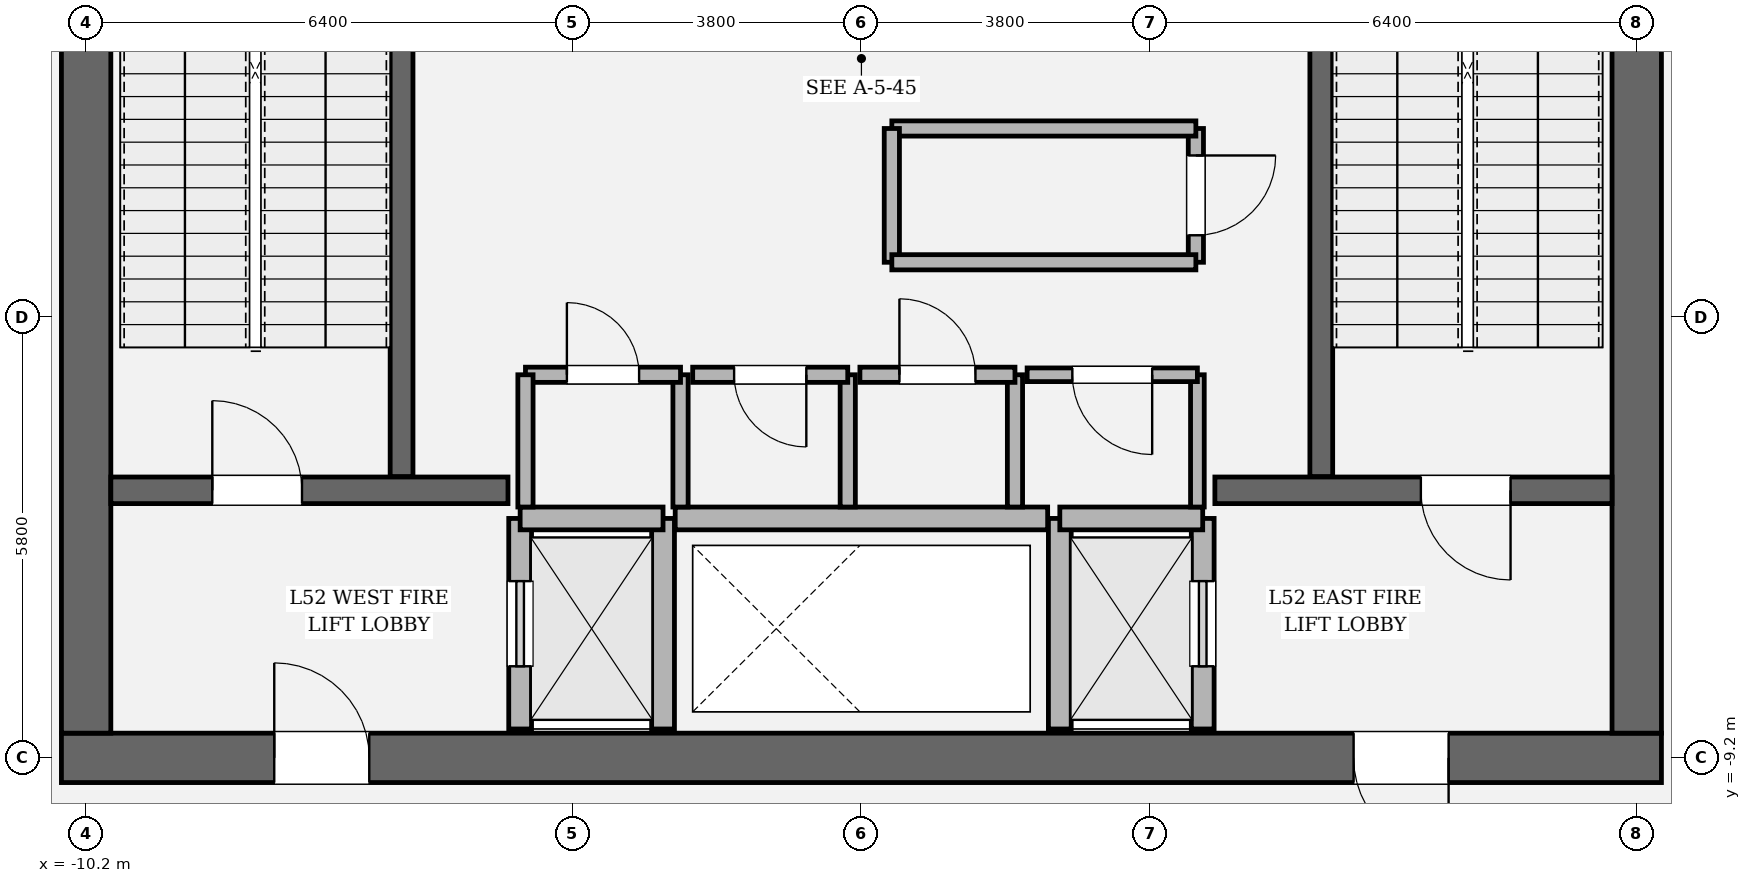
"""IFC4 building model, lengths in metres.
Left out: names, types, materials, properties, quantities, classifications, styles, units other than length and angle.
Written with IfcOpenShell. Run it as: python <this file> out.ifc"""

import sys

from ifc_helpers import new_model, si_unit, direction, frame, frame_2d, origin, place, context, subcontext, project, spatial, rectangle, extrude, element, fill, save


model = new_model("IFC4")
c1 = context("Model", 3, precision=1e-05, world=origin(), true_north=direction((0.0, 1.0)))
c2 = subcontext(c1, "Body", "Model", "MODEL_VIEW")
j1 = project(units=[si_unit("LENGTHUNIT", "METRE"), si_unit("PLANEANGLEUNIT", "RADIAN")], contexts=[c1])
p1 = place(None, origin())
s1 = spatial("IfcSite", under=j1, at=p1, CompositionType="ELEMENT")
p2 = place(p1, origin())
s2 = spatial("IfcBuilding", under=s1, at=p2, CompositionType="ELEMENT")
p3 = place(p2, frame((0.0, 0.0, 220.8)))
s3 = spatial("IfcBuildingStorey", under=s2, at=p3, CompositionType="ELEMENT", Elevation=220.8)
p4 = place(p3, frame((10.525, -9.2, 0.0), z_axis=(0.0, 0.0, 1.0), x_axis=(-1.0, 0.0, 0.0)))
e1 = element("IfcWall", 1, at=p4, inside=s3, PredefinedType="SHEAR", context=c2, shape_type="SweptSolid", body=[
    extrude(rectangle(XDim=21.05, YDim=0.65, at=frame_2d((10.525, 0.0))), origin(), (0.0, 0.0, 1.0), 4.05),
])
p5 = place(p4, frame((2.8, 0.0, 0.0)))
e2 = element("IfcOpeningElement", 2, at=p5, cuts=e1, PredefinedType="OPENING", context=c2, shape_type="SweptSolid", body=[
    extrude(rectangle(XDim=1.25, YDim=2.25, at=frame_2d((0.625, 1.125))), frame((0.0, 0.335, 0.0), z_axis=(0.0, -1.0, 0.0), x_axis=(1.0, 0.0, 0.0)), (0.0, 0.0, 1.0), 0.67),
])
p6 = place(p4, frame((17.0, 0.0, 0.0)))
e3 = element("IfcOpeningElement", 3, at=p6, cuts=e1, PredefinedType="OPENING", context=c2, shape_type="SweptSolid", body=[
    extrude(rectangle(XDim=1.25, YDim=2.25, at=frame_2d((0.625, 1.125))), frame((0.0, 0.335, 0.0), z_axis=(0.0, -1.0, 0.0), x_axis=(1.0, 0.0, 0.0)), (0.0, 0.0, 1.0), 0.67),
])
p7 = place(p3, frame((-10.2, -8.875, 0.0), z_axis=(0.0, 0.0, 1.0), x_axis=(0.0, 1.0, 0.0)))
e4 = element("IfcWall", 4, at=p7, inside=s3, PredefinedType="SHEAR", context=c2, shape_type="SweptSolid", body=[
    extrude(rectangle(XDim=17.75, YDim=0.65, at=frame_2d((8.875, 0.0))), origin(), (0.0, 0.0, 1.0), 4.05),
])
p8 = place(p7, frame((12.665, 0.0, 0.0)))
e5 = element("IfcOpeningElement", 5, at=p8, cuts=e4, PredefinedType="OPENING", context=c2, shape_type="SweptSolid", body=[
    extrude(rectangle(XDim=1.18, YDim=2.2, at=frame_2d((0.59, 1.1))), frame((0.0, 0.335, 0.0), z_axis=(0.0, -1.0, 0.0), x_axis=(1.0, 0.0, 0.0)), (0.0, 0.0, 1.0), 0.67),
])
p9 = place(p3, frame((10.2, 8.875, 0.0), z_axis=(0.0, 0.0, 1.0), x_axis=(0.0, -1.0, 0.0)))
e6 = element("IfcWall", 6, at=p9, inside=s3, PredefinedType="SHEAR", context=c2, shape_type="SweptSolid", body=[
    extrude(rectangle(XDim=17.75, YDim=0.65, at=frame_2d((8.875, 0.0))), origin(), (0.0, 0.0, 1.0), 4.05),
])
p10 = place(p9, frame((3.905, 0.0, 0.0)))
e7 = element("IfcOpeningElement", 7, at=p10, cuts=e6, PredefinedType="OPENING", context=c2, shape_type="SweptSolid", body=[
    extrude(rectangle(XDim=1.18, YDim=2.2, at=frame_2d((0.59, 1.1))), frame((0.0, 0.335, 0.0), z_axis=(0.0, -1.0, 0.0), x_axis=(1.0, 0.0, 0.0)), (0.0, 0.0, 1.0), 0.67),
])
for number, where, z_axis, x_axis in (
    (8, (-6.05, -5.5, 0.0), (0.0, 0.0, 1.0), (0.0, 1.0, 0.0)),
    (9, (6.05, 3.45, 0.0), (0.0, 0.0, 1.0), (0.0, -1.0, 0.0)),
):
    element("IfcWall", number, at=place(p3, frame(where, z_axis=z_axis, x_axis=x_axis)), inside=s3, PredefinedType="SOLIDWALL", context=c2, shape_type="SweptSolid", body=[
        extrude(rectangle(XDim=8.95, YDim=0.3, at=frame_2d((4.475, 0.0))), origin(), (0.0, 0.0, 1.0), 4.05),
    ])
p11 = place(p3, frame((-9.875, -5.68, 0.0), z_axis=(0.0, 0.0, 1.0), x_axis=(1.0, 0.0, 0.0)))
e10 = element("IfcWall", 10, at=p11, inside=s3, PredefinedType="SOLIDWALL", context=c2, shape_type="SweptSolid", body=[
    extrude(rectangle(XDim=5.225, YDim=0.35, at=frame_2d((2.613, 0.0))), origin(), (0.0, 0.0, 1.0), 4.05),
])
p12 = place(p11, frame((1.335, 0.0, 0.0)))
e11 = element("IfcOpeningElement", 11, at=p12, cuts=e10, PredefinedType="OPENING", context=c2, shape_type="SweptSolid", body=[
    extrude(rectangle(XDim=1.18, YDim=2.2, at=frame_2d((0.59, 1.1))), frame((0.0, 0.185, 0.0), z_axis=(0.0, -1.0, 0.0), x_axis=(1.0, 0.0, 0.0)), (0.0, 0.0, 1.0), 0.37),
])
p13 = place(p3, frame((4.65, -5.68, 0.0), z_axis=(0.0, 0.0, 1.0), x_axis=(1.0, 0.0, 0.0)))
e12 = element("IfcWall", 12, at=p13, inside=s3, PredefinedType="SOLIDWALL", context=c2, shape_type="SweptSolid", body=[
    extrude(rectangle(XDim=5.225, YDim=0.35, at=frame_2d((2.613, 0.0))), origin(), (0.0, 0.0, 1.0), 4.05),
])
p14 = place(p13, frame((2.71, 0.0, 0.0)))
e13 = element("IfcOpeningElement", 13, at=p14, cuts=e12, PredefinedType="OPENING", context=c2, shape_type="SweptSolid", body=[
    extrude(rectangle(XDim=1.18, YDim=2.2, at=frame_2d((0.59, 1.1))), frame((0.0, 0.185, 0.0), z_axis=(0.0, -1.0, 0.0), x_axis=(1.0, 0.0, 0.0)), (0.0, 0.0, 1.0), 0.37),
])
p15 = place(p3, frame((-4.49, -8.82, 0.0), z_axis=(0.0, 0.0, 1.0), x_axis=(0.0, 1.0, 0.0)))
e14 = element("IfcWall", 14, at=p15, inside=s3, PredefinedType="SOLIDWALL", context=c2, shape_type="SweptSolid", body=[
    extrude(rectangle(XDim=2.77, YDim=0.3, at=frame_2d((1.385, 0.0))), origin(), (0.0, 0.0, 1.0), 3.83),
])
p16 = place(p15, frame((0.825, 0.0, 0.0)))
e15 = element("IfcOpeningElement", 15, at=p16, cuts=e14, PredefinedType="OPENING", context=c2, shape_type="SweptSolid", body=[
    extrude(rectangle(XDim=1.12, YDim=2.25, at=frame_2d((0.56, 1.125))), frame((0.0, 0.16, 0.0), z_axis=(0.0, -1.0, 0.0), x_axis=(1.0, 0.0, 0.0)), (0.0, 0.0, 1.0), 0.32),
])
p17 = place(p3, frame((-2.61, -8.82, 0.0), z_axis=(0.0, 0.0, 1.0), x_axis=(0.0, 1.0, 0.0)))
e16 = element("IfcWall", 16, at=p17, inside=s3, PredefinedType="SOLIDWALL", context=c2, shape_type="SweptSolid", body=[
    extrude(rectangle(XDim=2.77, YDim=0.3, at=frame_2d((1.385, 0.0))), origin(), (0.0, 0.0, 1.0), 3.83),
])
p18 = place(p3, frame((-4.49, -6.05, 0.0), z_axis=(0.0, 0.0, 1.0), x_axis=(1.0, 0.0, 0.0)))
e17 = element("IfcWall", 17, at=p18, inside=s3, PredefinedType="SOLIDWALL", context=c2, shape_type="SweptSolid", body=[
    extrude(rectangle(XDim=1.88, YDim=0.3, at=frame_2d((0.94, 0.0))), origin(), (0.0, 0.0, 1.0), 3.83),
])
p19 = place(p3, frame((4.49, -8.82, 0.0), z_axis=(0.0, 0.0, 1.0), x_axis=(0.0, 1.0, 0.0)))
e18 = element("IfcWall", 18, at=p19, inside=s3, PredefinedType="SOLIDWALL", context=c2, shape_type="SweptSolid", body=[
    extrude(rectangle(XDim=2.77, YDim=0.3, at=frame_2d((1.385, 0.0))), origin(), (0.0, 0.0, 1.0), 3.83),
])
p20 = place(p19, frame((0.825, 0.0, 0.0)))
e19 = element("IfcOpeningElement", 19, at=p20, cuts=e18, PredefinedType="OPENING", context=c2, shape_type="SweptSolid", body=[
    extrude(rectangle(XDim=1.12, YDim=2.25, at=frame_2d((0.56, 1.125))), frame((0.0, 0.16, 0.0), z_axis=(0.0, -1.0, 0.0), x_axis=(1.0, 0.0, 0.0)), (0.0, 0.0, 1.0), 0.32),
])
p21 = place(p3, frame((2.61, -8.82, 0.0), z_axis=(0.0, 0.0, 1.0), x_axis=(0.0, 1.0, 0.0)))
e20 = element("IfcWall", 20, at=p21, inside=s3, PredefinedType="SOLIDWALL", context=c2, shape_type="SweptSolid", body=[
    extrude(rectangle(XDim=2.77, YDim=0.3, at=frame_2d((1.385, 0.0))), origin(), (0.0, 0.0, 1.0), 3.83),
])
p22 = place(p3, frame((2.61, -6.05, 0.0), z_axis=(0.0, 0.0, 1.0), x_axis=(1.0, 0.0, 0.0)))
e21 = element("IfcWall", 21, at=p22, inside=s3, PredefinedType="SOLIDWALL", context=c2, shape_type="SweptSolid", body=[
    extrude(rectangle(XDim=1.88, YDim=0.3, at=frame_2d((0.94, 0.0))), origin(), (0.0, 0.0, 1.0), 3.83),
])
p23 = place(p3, frame((-2.45, -6.05, 0.0), z_axis=(0.0, 0.0, 1.0), x_axis=(1.0, 0.0, 0.0)))
e22 = element("IfcWall", 22, at=p23, inside=s3, PredefinedType="SOLIDWALL", context=c2, shape_type="SweptSolid", body=[
    extrude(rectangle(XDim=4.9, YDim=0.3, at=frame_2d((2.45, 0.0))), origin(), (0.0, 0.0, 1.0), 3.83),
])
p24 = place(p3, frame((-2.38, -5.9, 0.0), z_axis=(0.0, 0.0, 1.0), x_axis=(0.0, 1.0, 0.0)))
e23 = element("IfcWall", 23, at=p24, inside=s3, PredefinedType="SOLIDWALL", context=c2, shape_type="SweptSolid", body=[
    extrude(rectangle(XDim=1.74, YDim=0.2, at=frame_2d((0.87, 0.0))), origin(), (0.0, 0.0, 1.0), 3.83),
])
p25 = place(p3, frame((-2.38, -4.16, 0.0), z_axis=(0.0, 0.0, 1.0), x_axis=(-1.0, 0.0, 0.0)))
e24 = element("IfcWall", 24, at=p25, inside=s3, PredefinedType="SOLIDWALL", context=c2, shape_type="SweptSolid", body=[
    extrude(rectangle(XDim=2.04, YDim=0.2, at=frame_2d((1.02, 0.0))), origin(), (0.0, 0.0, 1.0), 3.83),
])
p26 = place(p25, frame((0.545, 0.0, 0.0)))
e25 = element("IfcOpeningElement", 25, at=p26, cuts=e24, PredefinedType="OPENING", context=c2, shape_type="SweptSolid", body=[
    extrude(rectangle(XDim=0.95, YDim=2.15, at=frame_2d((0.475, 1.075))), frame((0.0, 0.11, 0.0), z_axis=(0.0, -1.0, 0.0), x_axis=(1.0, 0.0, 0.0)), (0.0, 0.0, 1.0), 0.22),
])
for number, where, z_axis, x_axis in (
    (26, (-4.42, -4.16, 0.0), (0.0, 0.0, 1.0), (0.0, -1.0, 0.0)),
    (27, (-0.18, -5.9, 0.0), (0.0, 0.0, 1.0), (0.0, 1.0, 0.0)),
):
    element("IfcWall", number, at=place(p3, frame(where, z_axis=z_axis, x_axis=x_axis)), inside=s3, PredefinedType="SOLIDWALL", context=c2, shape_type="SweptSolid", body=[
        extrude(rectangle(XDim=1.74, YDim=0.2, at=frame_2d((0.87, 0.0))), origin(), (0.0, 0.0, 1.0), 3.83),
    ])
p27 = place(p3, frame((-0.18, -4.16, 0.0), z_axis=(0.0, 0.0, 1.0), x_axis=(-1.0, 0.0, 0.0)))
e28 = element("IfcWall", 28, at=p27, inside=s3, PredefinedType="SOLIDWALL", context=c2, shape_type="SweptSolid", body=[
    extrude(rectangle(XDim=2.04, YDim=0.2, at=frame_2d((1.02, 0.0))), origin(), (0.0, 0.0, 1.0), 3.83),
])
p28 = place(p27, frame((0.545, 0.0, 0.0)))
e29 = element("IfcOpeningElement", 29, at=p28, cuts=e28, PredefinedType="OPENING", context=c2, shape_type="SweptSolid", body=[
    extrude(rectangle(XDim=0.95, YDim=2.15, at=frame_2d((0.475, 1.075))), frame((0.0, 0.11, 0.0), z_axis=(0.0, -1.0, 0.0), x_axis=(1.0, 0.0, 0.0)), (0.0, 0.0, 1.0), 0.22),
])
p29 = place(p3, frame((2.02, -5.9, 0.0), z_axis=(0.0, 0.0, 1.0), x_axis=(0.0, 1.0, 0.0)))
e30 = element("IfcWall", 30, at=p29, inside=s3, PredefinedType="SOLIDWALL", context=c2, shape_type="SweptSolid", body=[
    extrude(rectangle(XDim=1.74, YDim=0.2, at=frame_2d((0.87, 0.0))), origin(), (0.0, 0.0, 1.0), 3.83),
])
p30 = place(p3, frame((2.02, -4.16, 0.0), z_axis=(0.0, 0.0, 1.0), x_axis=(-1.0, 0.0, 0.0)))
e31 = element("IfcWall", 31, at=p30, inside=s3, PredefinedType="SOLIDWALL", context=c2, shape_type="SweptSolid", body=[
    extrude(rectangle(XDim=2.04, YDim=0.2, at=frame_2d((1.02, 0.0))), origin(), (0.0, 0.0, 1.0), 3.83),
])
p31 = place(p30, frame((0.52, 0.0, 0.0)))
e32 = element("IfcOpeningElement", 32, at=p31, cuts=e31, PredefinedType="OPENING", context=c2, shape_type="SweptSolid", body=[
    extrude(rectangle(XDim=1.0, YDim=2.15, at=frame_2d((0.5, 1.075))), frame((0.0, 0.11, 0.0), z_axis=(0.0, -1.0, 0.0), x_axis=(1.0, 0.0, 0.0)), (0.0, 0.0, 1.0), 0.22),
])
p32 = place(p3, frame((4.42, -5.9, 0.0), z_axis=(0.0, 0.0, 1.0), x_axis=(0.0, 1.0, 0.0)))
e33 = element("IfcWall", 33, at=p32, inside=s3, PredefinedType="PARTITIONING", context=c2, shape_type="SweptSolid", body=[
    extrude(rectangle(XDim=1.74, YDim=0.18, at=frame_2d((0.87, 0.0))), origin(), (0.0, 0.0, 1.0), 3.83),
])
p33 = place(p3, frame((4.42, -4.16, 0.0), z_axis=(0.0, 0.0, 1.0), x_axis=(-1.0, 0.0, 0.0)))
e34 = element("IfcWall", 34, at=p33, inside=s3, PredefinedType="PARTITIONING", context=c2, shape_type="SweptSolid", body=[
    extrude(rectangle(XDim=2.24, YDim=0.18, at=frame_2d((1.12, 0.0))), origin(), (0.0, 0.0, 1.0), 3.83),
])
p34 = place(p33, frame((0.595, 0.0, 0.0)))
e35 = element("IfcOpeningElement", 35, at=p34, cuts=e34, PredefinedType="OPENING", context=c2, shape_type="SweptSolid", body=[
    extrude(rectangle(XDim=1.05, YDim=2.2, at=frame_2d((0.525, 1.1))), frame((0.0, 0.1, 0.0), z_axis=(0.0, -1.0, 0.0), x_axis=(1.0, 0.0, 0.0)), (0.0, 0.0, 1.0), 0.2),
])
p35 = place(p3, frame((4.4, -2.68, 0.0), z_axis=(0.0, 0.0, 1.0), x_axis=(0.0, 1.0, 0.0)))
e36 = element("IfcWall", 36, at=p35, inside=s3, PredefinedType="SOLIDWALL", context=c2, shape_type="SweptSolid", body=[
    extrude(rectangle(XDim=1.76, YDim=0.2, at=frame_2d((0.88, 0.0))), origin(), (0.0, 0.0, 1.0), 3.83),
])
p36 = place(p35, frame((0.355, 0.0, 0.0)))
e37 = element("IfcOpeningElement", 37, at=p36, cuts=e36, PredefinedType="OPENING", context=c2, shape_type="SweptSolid", body=[
    extrude(rectangle(XDim=1.05, YDim=2.2, at=frame_2d((0.525, 1.1))), frame((0.0, 0.11, 0.0), z_axis=(0.0, -1.0, 0.0), x_axis=(1.0, 0.0, 0.0)), (0.0, 0.0, 1.0), 0.22),
])
p37 = place(p3, frame((4.4, -0.92, 0.0), z_axis=(0.0, 0.0, 1.0), x_axis=(-1.0, 0.0, 0.0)))
e38 = element("IfcWall", 38, at=p37, inside=s3, PredefinedType="SOLIDWALL", context=c2, shape_type="SweptSolid", body=[
    extrude(rectangle(XDim=4.0, YDim=0.2, at=frame_2d((2.0, 0.0))), origin(), (0.0, 0.0, 1.0), 3.83),
])
p38 = place(p3, frame((0.4, -0.92, 0.0), z_axis=(0.0, 0.0, 1.0), x_axis=(0.0, -1.0, 0.0)))
e39 = element("IfcWall", 39, at=p38, inside=s3, PredefinedType="SOLIDWALL", context=c2, shape_type="SweptSolid", body=[
    extrude(rectangle(XDim=1.76, YDim=0.2, at=frame_2d((0.88, 0.0))), origin(), (0.0, 0.0, 1.0), 3.83),
])
p39 = place(p3, frame((0.4, -2.68, 0.0), z_axis=(0.0, 0.0, 1.0), x_axis=(1.0, 0.0, 0.0)))
e40 = element("IfcWall", 40, at=p39, inside=s3, PredefinedType="SOLIDWALL", context=c2, shape_type="SweptSolid", body=[
    extrude(rectangle(XDim=4.0, YDim=0.2, at=frame_2d((2.0, 0.0))), origin(), (0.0, 0.0, 1.0), 3.83),
])
p40 = place(p12, origin())
e41 = element("IfcDoor", 41, at=p40, inside=s3, OperationType="SINGLE_SWING_LEFT", PredefinedType="DOOR", context=c2, shape_type="SweptSolid", body=[
    extrude(rectangle(XDim=1.18, YDim=2.2, at=frame_2d((0.59, 1.1))), frame((0.0, 0.025, 0.0), z_axis=(0.0, -1.0, 0.0), x_axis=(1.0, 0.0, 0.0)), (0.0, 0.0, 1.0), 0.05),
])
fill(e11, e41)
p41 = place(p14, origin())
e42 = element("IfcDoor", 42, at=p41, inside=s3, OperationType="SINGLE_SWING_RIGHT", PredefinedType="DOOR", context=c2, shape_type="SweptSolid", body=[
    extrude(rectangle(XDim=1.18, YDim=2.2, at=frame_2d((0.59, 1.1))), frame((0.0, 0.025, 0.0), z_axis=(0.0, -1.0, 0.0), x_axis=(1.0, 0.0, 0.0)), (0.0, 0.0, 1.0), 0.05),
])
fill(e13, e42)
p42 = place(p5, origin())
e43 = element("IfcDoor", 43, at=p42, inside=s3, OperationType="SINGLE_SWING_LEFT", PredefinedType="DOOR", context=c2, shape_type="SweptSolid", body=[
    extrude(rectangle(XDim=1.25, YDim=2.25, at=frame_2d((0.625, 1.125))), frame((0.0, 0.025, 0.0), z_axis=(0.0, -1.0, 0.0), x_axis=(1.0, 0.0, 0.0)), (0.0, 0.0, 1.0), 0.05),
])
fill(e2, e43)
p43 = place(p6, origin())
e44 = element("IfcDoor", 44, at=p43, inside=s3, OperationType="SINGLE_SWING_RIGHT", PredefinedType="DOOR", context=c2, shape_type="SweptSolid", body=[
    extrude(rectangle(XDim=1.25, YDim=2.25, at=frame_2d((0.625, 1.125))), frame((0.0, 0.025, 0.0), z_axis=(0.0, -1.0, 0.0), x_axis=(1.0, 0.0, 0.0)), (0.0, 0.0, 1.0), 0.05),
])
fill(e3, e44)
p44 = place(p16, origin())
e45 = element("IfcDoor", 45, at=p44, inside=s3, OperationType="SLIDING_TO_LEFT", PredefinedType="DOOR", context=c2, shape_type="SweptSolid", body=[
    extrude(rectangle(XDim=1.12, YDim=2.25, at=frame_2d((0.56, 1.125))), frame((0.0, 0.025, 0.0), z_axis=(0.0, -1.0, 0.0), x_axis=(1.0, 0.0, 0.0)), (0.0, 0.0, 1.0), 0.05),
])
fill(e15, e45)
p45 = place(p20, origin())
e46 = element("IfcDoor", 46, at=p45, inside=s3, OperationType="SLIDING_TO_RIGHT", PredefinedType="DOOR", context=c2, shape_type="SweptSolid", body=[
    extrude(rectangle(XDim=1.12, YDim=2.25, at=frame_2d((0.56, 1.125))), frame((0.0, 0.025, 0.0), z_axis=(0.0, -1.0, 0.0), x_axis=(1.0, 0.0, 0.0)), (0.0, 0.0, 1.0), 0.05),
])
fill(e19, e46)
p46 = place(p26, origin())
e47 = element("IfcDoor", 47, at=p46, inside=s3, OperationType="SINGLE_SWING_RIGHT", PredefinedType="DOOR", context=c2, shape_type="SweptSolid", body=[
    extrude(rectangle(XDim=0.95, YDim=2.15, at=frame_2d((0.475, 1.075))), frame((0.0, 0.025, 0.0), z_axis=(0.0, -1.0, 0.0), x_axis=(1.0, 0.0, 0.0)), (0.0, 0.0, 1.0), 0.05),
])
fill(e25, e47)
p47 = place(p28, origin())
e48 = element("IfcDoor", 48, at=p47, inside=s3, OperationType="SINGLE_SWING_LEFT", PredefinedType="DOOR", context=c2, shape_type="SweptSolid", body=[
    extrude(rectangle(XDim=0.95, YDim=2.15, at=frame_2d((0.475, 1.075))), frame((0.0, 0.025, 0.0), z_axis=(0.0, -1.0, 0.0), x_axis=(1.0, 0.0, 0.0)), (0.0, 0.0, 1.0), 0.05),
])
fill(e29, e48)
p48 = place(p31, origin())
e49 = element("IfcDoor", 49, at=p48, inside=s3, OperationType="SINGLE_SWING_RIGHT", PredefinedType="DOOR", context=c2, shape_type="SweptSolid", body=[
    extrude(rectangle(XDim=1.0, YDim=2.15, at=frame_2d((0.5, 1.075))), frame((0.0, 0.025, 0.0), z_axis=(0.0, -1.0, 0.0), x_axis=(1.0, 0.0, 0.0)), (0.0, 0.0, 1.0), 0.05),
])
fill(e32, e49)
p49 = place(p34, origin())
e50 = element("IfcDoor", 50, at=p49, inside=s3, OperationType="SINGLE_SWING_LEFT", PredefinedType="DOOR", context=c2, shape_type="SweptSolid", body=[
    extrude(rectangle(XDim=1.05, YDim=2.2, at=frame_2d((0.525, 1.1))), frame((0.0, 0.025, 0.0), z_axis=(0.0, -1.0, 0.0), x_axis=(1.0, 0.0, 0.0)), (0.0, 0.0, 1.0), 0.05),
])
fill(e35, e50)
p50 = place(p36, origin())
e51 = element("IfcDoor", 51, at=p50, inside=s3, OperationType="SINGLE_SWING_RIGHT", PredefinedType="DOOR", context=c2, shape_type="SweptSolid", body=[
    extrude(rectangle(XDim=1.05, YDim=2.2, at=frame_2d((0.525, 1.1))), frame((0.0, 0.025, 0.0), z_axis=(0.0, -1.0, 0.0), x_axis=(1.0, 0.0, 0.0)), (0.0, 0.0, 1.0), 0.05),
])
fill(e37, e51)
save(model, sys.argv[1])
